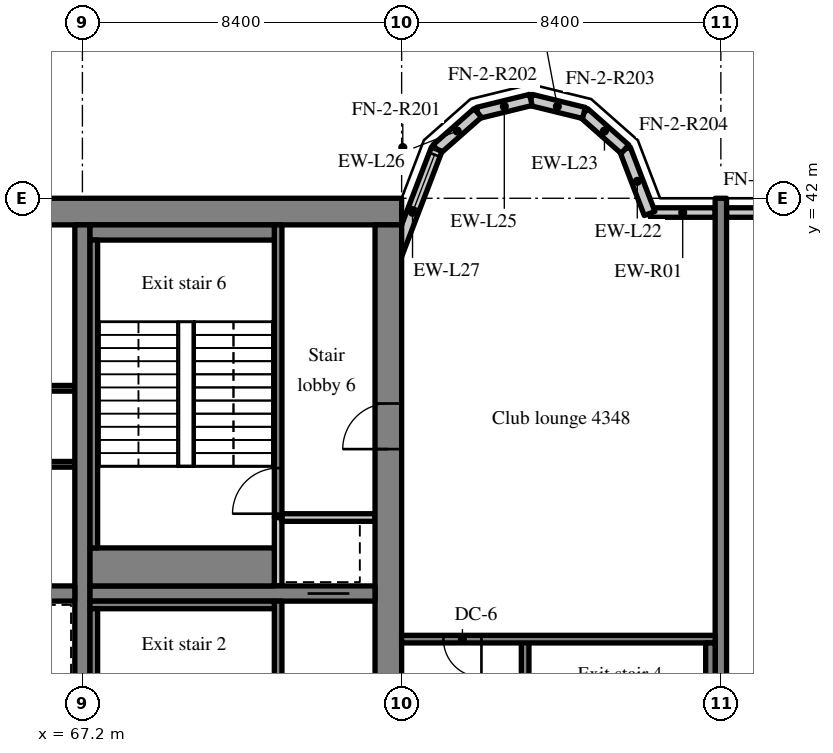
"""IFC4 building model, lengths in metres.
Left out: names, types, materials, properties, quantities, classifications, styles, units other than length and angle.
Written with IfcOpenShell. Run it as: python <this file> out.ifc"""

import sys

from ifc_helpers import new_model, si_unit, direction, frame, frame_2d, origin, place, context, subcontext, project, spatial, rectangle, extrude, source, transform, mapped, element, fill, save


model = new_model("IFC4")
c1 = context("Model", 3, precision=1e-05, world=origin(), true_north=direction((0.0, 1.0)))
c2 = subcontext(c1, "Body", "Model", "MODEL_VIEW")
j1 = project(units=[si_unit("LENGTHUNIT", "METRE"), si_unit("PLANEANGLEUNIT", "RADIAN")], contexts=[c1])
p1 = place(None, origin())
s1 = spatial("IfcSite", under=j1, at=p1, CompositionType="ELEMENT")
p2 = place(p1, origin())
s2 = spatial("IfcBuilding", under=s1, at=p2, CompositionType="ELEMENT")
p3 = place(p2, frame((0.0, 0.0, 178.2)))
s3 = spatial("IfcBuildingStorey", under=s2, at=p3, CompositionType="ELEMENT", Elevation=178.2)
m1 = source(origin(), c2, "Body", "SweptSolid", [
    extrude(rectangle(XDim=50.4, YDim=0.7, at=frame_2d((25.2, 0.0))), origin(), (0.0, 0.0, 1.0), 3.52),
])
p4 = place(p3, frame((25.2, 41.65, 0.0), z_axis=(0.0, 0.0, 1.0), x_axis=(1.0, 0.0, 0.0)))
e1 = element("IfcWall", 1, at=p4, inside=s3, PredefinedType="SHEAR", context=c2, shape_type="MappedRepresentation", body=[
    mapped(m1, transform((0.0, 0.0, 0.0), scale=1.0)),
])
m2 = source(origin(), c2, "Body", "SweptSolid", [
    extrude(rectangle(XDim=18.6, YDim=0.7, at=frame_2d((9.3, 0.0))), origin(), (0.0, 0.0, 1.0), 3.52),
])
p5 = place(p3, frame((75.25, 22.7, 0.0), z_axis=(0.0, 0.0, 1.0), x_axis=(0.0, 1.0, 0.0)))
e2 = element("IfcWall", 2, at=p5, inside=s3, PredefinedType="SHEAR", context=c2, shape_type="MappedRepresentation", body=[
    mapped(m2, transform((0.0, 0.0, 0.0), scale=1.0)),
])
m3 = source(origin(), c2, "Body", "SweptSolid", [
    extrude(rectangle(XDim=1.2, YDim=2.1, at=frame_2d((0.6, 1.05))), frame((0.0, 0.36, 0.0), z_axis=(0.0, -1.0, 0.0), x_axis=(1.0, 0.0, 0.0)), (0.0, 0.0, 1.0), 0.72),
])
p6 = place(p5, frame((12.7, 0.0, 0.0)))
e3 = element("IfcOpeningElement", 3, at=p6, cuts=e2, PredefinedType="OPENING", context=c2, shape_type="MappedRepresentation", body=[
    mapped(m3, transform((0.0, 0.0, 0.0), scale=1.0)),
])
m4 = source(origin(), c2, "Body", "SweptSolid", [
    extrude(rectangle(XDim=18.6, YDim=0.4, at=frame_2d((9.3, 0.0))), origin(), (0.0, 0.0, 1.0), 3.52),
])
p7 = place(p3, frame((67.2, 22.7, 0.0), z_axis=(0.0, 0.0, 1.0), x_axis=(0.0, 1.0, 0.0)))
e4 = element("IfcWall", 4, at=p7, inside=s3, PredefinedType="SHEAR", context=c2, shape_type="MappedRepresentation", body=[
    mapped(m4, transform((0.0, 0.0, 0.0), scale=1.0)),
])
m5 = source(origin(), c2, "Body", "SweptSolid", [
    extrude(rectangle(XDim=16.4, YDim=0.4, at=frame_2d((8.2, 0.0))), origin(), (0.0, 0.0, 1.0), 3.52),
])
p8 = place(p3, frame((50.6, 31.6, 0.0), z_axis=(0.0, 0.0, 1.0), x_axis=(1.0, 0.0, 0.0)))
e5 = element("IfcWall", 5, at=p8, inside=s3, PredefinedType="SHEAR", context=c2, shape_type="MappedRepresentation", body=[
    mapped(m5, transform((0.0, 0.0, 0.0), scale=1.0)),
])
m6 = source(origin(), c2, "Body", "SweptSolid", [
    extrude(rectangle(XDim=1.0, YDim=2.1, at=frame_2d((0.5, 1.05))), frame((0.0, 0.21, 0.0), z_axis=(0.0, -1.0, 0.0), x_axis=(1.0, 0.0, 0.0)), (0.0, 0.0, 1.0), 0.42),
])
p9 = place(p8, frame((0.6, 0.0, 0.0)))
e6 = element("IfcOpeningElement", 6, at=p9, cuts=e5, PredefinedType="OPENING", context=c2, shape_type="MappedRepresentation", body=[
    mapped(m6, transform((0.0, 0.0, 0.0), scale=1.0)),
])
m7 = source(origin(), c2, "Body", "SweptSolid", [
    extrude(rectangle(XDim=7.5, YDim=0.4, at=frame_2d((3.75, 0.0))), origin(), (0.0, 0.0, 1.0), 3.52),
])
p10 = place(p3, frame((67.4, 31.6, 0.0), z_axis=(0.0, 0.0, 1.0), x_axis=(1.0, 0.0, 0.0)))
e7 = element("IfcWall", 7, at=p10, inside=s3, PredefinedType="SHEAR", context=c2, shape_type="MappedRepresentation", body=[
    mapped(m7, transform((0.0, 0.0, 0.0), scale=1.0)),
])
m8 = source(origin(), c2, "Body", "SweptSolid", [
    extrude(rectangle(XDim=1.1, YDim=2.1, at=frame_2d((0.55, 1.05))), frame((0.0, 0.21, 0.0), z_axis=(0.0, -1.0, 0.0), x_axis=(1.0, 0.0, 0.0)), (0.0, 0.0, 1.0), 0.42),
])
p11 = place(p10, frame((5.725, 0.0, 0.0)))
e8 = element("IfcOpeningElement", 8, at=p11, cuts=e7, PredefinedType="OPENING", context=c2, shape_type="MappedRepresentation", body=[
    mapped(m8, transform((0.0, 0.0, 0.0), scale=1.0)),
])
m9 = source(origin(), c2, "Body", "SweptSolid", [
    extrude(rectangle(XDim=20.0, YDim=0.3, at=frame_2d((10.0, 0.0))), origin(), (0.0, 0.0, 1.0), 3.52),
])
p12 = place(p3, frame((84.0, 22.0, 0.0), z_axis=(0.0, 0.0, 1.0), x_axis=(0.0, 1.0, 0.0)))
e9 = element("IfcWall", 9, at=p12, inside=s3, PredefinedType="SHEAR", context=c2, shape_type="MappedRepresentation", body=[
    mapped(m9, transform((0.0, 0.0, 0.0), scale=1.0)),
])
m10 = source(origin(), c2, "Body", "SweptSolid", [
    extrude(rectangle(XDim=1.708, YDim=0.25, at=frame_2d((0.854, 0.0))), origin(), (0.0, 0.0, 1.0), 2.87),
])
p13 = place(p3, frame((83.85, 41.625, 0.0), z_axis=(0.0, 0.0, 1.0), x_axis=(-1.0, 0.0, 0.0)))
e10 = element("IfcWall", 10, at=p13, inside=s3, PredefinedType="SOLIDWALL", context=c2, shape_type="MappedRepresentation", body=[
    mapped(m10, transform((0.0, 0.0, 0.0), scale=1.0)),
])
m11 = source(origin(), c2, "Body", "SweptSolid", [
    extrude(rectangle(XDim=4.095, YDim=0.25, at=frame_2d((2.047, 0.0))), origin(), (0.0, 0.0, 1.0), 2.87),
])
p14 = place(p3, frame((88.245, 41.625, 0.0), z_axis=(0.0, 0.0, 1.0), x_axis=(-1.0, 0.0, 0.0)))
e11 = element("IfcWall", 11, at=p14, inside=s3, PredefinedType="SOLIDWALL", context=c2, shape_type="MappedRepresentation", body=[
    mapped(m11, transform((0.0, 0.0, 0.0), scale=1.0)),
])
m12 = source(origin(), c2, "Body", "SweptSolid", [
    extrude(rectangle(XDim=1.5, YDim=1.5, at=frame_2d((0.75, 0.75))), frame((0.0, 0.135, 0.0), z_axis=(0.0, -1.0, 0.0), x_axis=(1.0, 0.0, 0.0)), (0.0, 0.0, 1.0), 0.27),
])
p15 = place(p14, frame((1.297, 0.0, 0.9)))
e12 = element("IfcOpeningElement", 12, at=p15, cuts=e11, PredefinedType="OPENING", context=c2, shape_type="MappedRepresentation", body=[
    mapped(m12, transform((0.0, 0.0, 0.0), scale=1.0)),
])
m13 = source(origin(), c2, "Body", "SweptSolid", [
    extrude(rectangle(XDim=1.812, YDim=0.3, at=frame_2d((0.906, 0.0))), origin(), (0.0, 0.0, 1.0), 3.52),
])
p16 = place(p3, frame((82.125, 41.6, 0.0), z_axis=(0.0, 0.0, 1.0), x_axis=(-0.357877270961, 0.93376863244, 0.0)))
e13 = element("IfcWall", 13, at=p16, inside=s3, PredefinedType="SOLIDWALL", context=c2, shape_type="MappedRepresentation", body=[
    mapped(m13, transform((0.0, 0.0, 0.0), scale=1.0)),
])
m14 = source(origin(), c2, "Body", "SweptSolid", [
    extrude(rectangle(XDim=1.44, YDim=0.3, at=frame_2d((0.72, 0.0))), origin(), (0.0, 0.0, 1.0), 3.52),
])
p17 = place(p3, frame((81.477, 43.292, 0.0), z_axis=(0.0, 0.0, 1.0), x_axis=(-0.74957555648, 0.661918790432, 0.0)))
e14 = element("IfcWall", 14, at=p17, inside=s3, PredefinedType="SOLIDWALL", context=c2, shape_type="MappedRepresentation", body=[
    mapped(m14, transform((0.0, 0.0, 0.0), scale=1.0)),
])
m15 = source(origin(), c2, "Body", "SweptSolid", [
    extrude(rectangle(XDim=1.439, YDim=0.3, at=frame_2d((0.719, 0.0))), origin(), (0.0, 0.0, 1.0), 3.52),
])
for number, where, z_axis, x_axis in (
    (15, (80.397, 44.245, 0.0), (0.0, 0.0, 1.0), (-0.971, 0.238, 0.0)),
    (16, (79.0, 44.588, 0.0), (0.0, 0.0, 1.0), (-0.971, -0.238, 0.0)),
):
    element("IfcWall", number, at=place(p3, frame(where, z_axis=z_axis, x_axis=x_axis)), inside=s3, PredefinedType="SOLIDWALL", context=c2, shape_type="MappedRepresentation", body=[
        mapped(m15, transform((0.0, 0.0, 0.0), scale=1.0)),
    ])
p18 = place(p3, frame((77.603, 44.245, 0.0), z_axis=(0.0, 0.0, 1.0), x_axis=(-0.74957555648, -0.661918790432, 0.0)))
e17 = element("IfcWall", 17, at=p18, inside=s3, PredefinedType="SOLIDWALL", context=c2, shape_type="MappedRepresentation", body=[
    mapped(m14, transform((0.0, 0.0, 0.0), scale=1.0)),
])
m16 = source(origin(), c2, "Body", "SweptSolid", [
    extrude(rectangle(XDim=3.559, YDim=0.3, at=frame_2d((1.78, 0.0))), origin(), (0.0, 0.0, 1.0), 3.52),
])
p19 = place(p3, frame((76.523, 43.292, 0.0), z_axis=(0.0, 0.0, 1.0), x_axis=(-0.35779745313, -0.933799219604, 0.0)))
e18 = element("IfcWall", 18, at=p19, inside=s3, PredefinedType="SOLIDWALL", context=c2, shape_type="MappedRepresentation", body=[
    mapped(m16, transform((0.0, 0.0, 0.0), scale=1.0)),
])
m17 = source(origin(), c2, "Body", "SweptSolid", [
    extrude(rectangle(XDim=1.5, YDim=2.0, at=frame_2d((0.75, 1.0))), frame((0.0, 0.16, 0.0), z_axis=(0.0, -1.0, 0.0), x_axis=(1.0, 0.0, 0.0)), (0.0, 0.0, 1.0), 0.32),
])
p20 = place(p19, frame((0.156, 0.0, 0.9)))
e19 = element("IfcOpeningElement", 19, at=p20, cuts=e18, PredefinedType="OPENING", context=c2, shape_type="MappedRepresentation", body=[
    mapped(m17, transform((0.0, 0.0, 0.0), scale=1.0)),
])
m18 = source(origin(), c2, "Body", "SweptSolid", [
    extrude(rectangle(XDim=14.2, YDim=0.15, at=frame_2d((7.1, 0.0))), origin(), (0.0, 0.0, 1.0), 3.52),
])
p21 = place(p3, frame((67.0, 35.0, 0.0), z_axis=(0.0, 0.0, 1.0), x_axis=(-1.0, 0.0, 0.0)))
e20 = element("IfcWall", 20, at=p21, inside=s3, PredefinedType="PARTITIONING", context=c2, shape_type="MappedRepresentation", body=[
    mapped(m18, transform((0.0, 0.0, 0.0), scale=1.0)),
])
m19 = source(origin(), c2, "Body", "SweptSolid", [
    extrude(rectangle(XDim=0.9, YDim=2.1, at=frame_2d((0.45, 1.05))), frame((0.0, 0.085, 0.0), z_axis=(0.0, -1.0, 0.0), x_axis=(1.0, 0.0, 0.0)), (0.0, 0.0, 1.0), 0.17),
])
p22 = place(p21, frame((6.612, 0.0, 0.0)))
e21 = element("IfcOpeningElement", 21, at=p22, cuts=e20, PredefinedType="OPENING", context=c2, shape_type="MappedRepresentation", body=[
    mapped(m19, transform((0.0, 0.0, 0.0), scale=1.0)),
])
m20 = source(origin(), c2, "Body", "SweptSolid", [
    extrude(rectangle(XDim=16.4, YDim=0.15, at=frame_2d((8.2, 0.0))), origin(), (0.0, 0.0, 1.0), 3.52),
])
p23 = place(p3, frame((67.0, 37.0, 0.0), z_axis=(0.0, 0.0, 1.0), x_axis=(-1.0, 0.0, 0.0)))
e22 = element("IfcWall", 22, at=p23, inside=s3, PredefinedType="PARTITIONING", context=c2, shape_type="MappedRepresentation", body=[
    mapped(m20, transform((0.0, 0.0, 0.0), scale=1.0)),
])
p24 = place(p23, frame((3.24, 0.0, 0.0)))
e23 = element("IfcOpeningElement", 23, at=p24, cuts=e22, PredefinedType="OPENING", context=c2, shape_type="MappedRepresentation", body=[
    mapped(m19, transform((0.0, 0.0, 0.0), scale=1.0)),
])
p25 = place(p23, frame((8.16, 0.0, 0.0)))
e24 = element("IfcOpeningElement", 24, at=p25, cuts=e22, PredefinedType="OPENING", context=c2, shape_type="MappedRepresentation", body=[
    mapped(m19, transform((0.0, 0.0, 0.0), scale=1.0)),
])
p26 = place(p23, frame((11.44, 0.0, 0.0)))
e25 = element("IfcOpeningElement", 25, at=p26, cuts=e22, PredefinedType="OPENING", context=c2, shape_type="MappedRepresentation", body=[
    mapped(m19, transform((0.0, 0.0, 0.0), scale=1.0)),
])
p27 = place(p23, frame((14.72, 0.0, 0.0)))
e26 = element("IfcOpeningElement", 26, at=p27, cuts=e22, PredefinedType="OPENING", context=c2, shape_type="MappedRepresentation", body=[
    mapped(m19, transform((0.0, 0.0, 0.0), scale=1.0)),
])
m21 = source(origin(), c2, "Body", "SweptSolid", [
    extrude(rectangle(XDim=8.7, YDim=0.2, at=frame_2d((4.35, 0.0))), origin(), (0.0, 0.0, 1.0), 3.52),
])
p28 = place(p3, frame((72.35, 22.7, 0.0), z_axis=(0.0, 0.0, 1.0), x_axis=(0.0, 1.0, 0.0)))
e27 = element("IfcWall", 27, at=p28, inside=s3, PredefinedType="SOLIDWALL", context=c2, shape_type="MappedRepresentation", body=[
    mapped(m21, transform((0.0, 0.0, 0.0), scale=1.0)),
])
m22 = source(origin(), c2, "Body", "SweptSolid", [
    extrude(rectangle(XDim=1.2, YDim=2.1, at=frame_2d((0.6, 1.05))), frame((0.0, 0.11, 0.0), z_axis=(0.0, -1.0, 0.0), x_axis=(1.0, 0.0, 0.0)), (0.0, 0.0, 1.0), 0.22),
])
p29 = place(p28, frame((0.9, 0.0, 0.0)))
e28 = element("IfcOpeningElement", 28, at=p29, cuts=e27, PredefinedType="OPENING", context=c2, shape_type="MappedRepresentation", body=[
    mapped(m22, transform((0.0, 0.0, 0.0), scale=1.0)),
])
m23 = source(origin(), c2, "Body", "SweptSolid", [
    extrude(rectangle(XDim=1.8, YDim=0.2, at=frame_2d((0.9, 0.0))), origin(), (0.0, 0.0, 1.0), 3.52),
])
p30 = place(p3, frame((72.35, 31.8, 0.0), z_axis=(0.0, 0.0, 1.0), x_axis=(0.0, 1.0, 0.0)))
e29 = element("IfcWall", 29, at=p30, inside=s3, PredefinedType="SOLIDWALL", context=c2, shape_type="MappedRepresentation", body=[
    mapped(m23, transform((0.0, 0.0, 0.0), scale=1.0)),
])
m24 = source(origin(), c2, "Body", "SweptSolid", [
    extrude(rectangle(XDim=2.45, YDim=0.2, at=frame_2d((1.225, 0.0))), origin(), (0.0, 0.0, 1.0), 3.52),
])
p31 = place(p3, frame((72.45, 33.6, 0.0), z_axis=(0.0, 0.0, 1.0), x_axis=(1.0, 0.0, 0.0)))
e30 = element("IfcWall", 30, at=p31, inside=s3, PredefinedType="SOLIDWALL", context=c2, shape_type="MappedRepresentation", body=[
    mapped(m24, transform((0.0, 0.0, 0.0), scale=1.0)),
])
m25 = source(origin(), c2, "Body", "SweptSolid", [
    extrude(rectangle(XDim=7.7, YDim=0.2, at=frame_2d((3.85, 0.0))), origin(), (0.0, 0.0, 1.0), 3.52),
])
p32 = place(p3, frame((72.35, 33.6, 0.0), z_axis=(0.0, 0.0, 1.0), x_axis=(0.0, 1.0, 0.0)))
e31 = element("IfcWall", 31, at=p32, inside=s3, PredefinedType="SOLIDWALL", context=c2, shape_type="MappedRepresentation", body=[
    mapped(m25, transform((0.0, 0.0, 0.0), scale=1.0)),
])
p33 = place(p32, frame((0.1, 0.0, 0.0)))
e32 = element("IfcOpeningElement", 32, at=p33, cuts=e31, PredefinedType="OPENING", context=c2, shape_type="MappedRepresentation", body=[
    mapped(m22, transform((0.0, 0.0, 0.0), scale=1.0)),
])
m26 = source(origin(), c2, "Body", "SweptSolid", [
    extrude(rectangle(XDim=8.3, YDim=0.2, at=frame_2d((4.15, 0.0))), origin(), (0.0, 0.0, 1.0), 3.52),
])
p34 = place(p3, frame((78.85, 22.1, 0.0), z_axis=(0.0, 0.0, 1.0), x_axis=(0.0, 1.0, 0.0)))
e33 = element("IfcWall", 33, at=p34, inside=s3, PredefinedType="SOLIDWALL", context=c2, shape_type="MappedRepresentation", body=[
    mapped(m26, transform((0.0, 0.0, 0.0), scale=1.0)),
])
p35 = place(p34, frame((0.6, 0.0, 0.0)))
e34 = element("IfcOpeningElement", 34, at=p35, cuts=e33, PredefinedType="OPENING", context=c2, shape_type="MappedRepresentation", body=[
    mapped(m22, transform((0.0, 0.0, 0.0), scale=1.0)),
])
m27 = source(origin(), c2, "Body", "SweptSolid", [
    extrude(rectangle(XDim=8.25, YDim=0.2, at=frame_2d((4.125, 0.0))), origin(), (0.0, 0.0, 1.0), 3.52),
])
p36 = place(p3, frame((83.85, 30.4, 0.0), z_axis=(0.0, 0.0, 1.0), x_axis=(-1.0, 0.0, 0.0)))
e35 = element("IfcWall", 35, at=p36, inside=s3, PredefinedType="SOLIDWALL", context=c2, shape_type="MappedRepresentation", body=[
    mapped(m27, transform((0.0, 0.0, 0.0), scale=1.0)),
])
m28 = source(origin(), c2, "Body", "SweptSolid", [
    extrude(rectangle(XDim=1.0, YDim=2.1, at=frame_2d((0.5, 1.05))), frame((0.0, 0.11, 0.0), z_axis=(0.0, -1.0, 0.0), x_axis=(1.0, 0.0, 0.0)), (0.0, 0.0, 1.0), 0.22),
])
p37 = place(p36, frame((6.15, 0.0, 0.0)))
e36 = element("IfcOpeningElement", 36, at=p37, cuts=e35, PredefinedType="OPENING", context=c2, shape_type="MappedRepresentation", body=[
    mapped(m28, transform((0.0, 0.0, 0.0), scale=1.0)),
])
m29 = source(origin(), c2, "Body", "SweptSolid", [
    extrude(rectangle(XDim=4.85, YDim=0.2, at=frame_2d((2.425, 0.0))), origin(), (0.0, 0.0, 1.0), 3.52),
])
p38 = place(p3, frame((67.4, 31.3, 0.0), z_axis=(0.0, 0.0, 1.0), x_axis=(1.0, 0.0, 0.0)))
e37 = element("IfcWall", 37, at=p38, inside=s3, PredefinedType="SOLIDWALL", context=c2, shape_type="MappedRepresentation", body=[
    mapped(m29, transform((0.0, 0.0, 0.0), scale=1.0)),
])
m30 = source(origin(), c2, "Body", "SweptSolid", [
    extrude(rectangle(XDim=8.1, YDim=0.2, at=frame_2d((4.05, 0.0))), origin(), (0.0, 0.0, 1.0), 3.52),
])
p39 = place(p3, frame((67.5, 23.1, 0.0), z_axis=(0.0, 0.0, 1.0), x_axis=(0.0, 1.0, 0.0)))
e38 = element("IfcWall", 38, at=p39, inside=s3, PredefinedType="SOLIDWALL", context=c2, shape_type="MappedRepresentation", body=[
    mapped(m30, transform((0.0, 0.0, 0.0), scale=1.0)),
])
m31 = source(origin(), c2, "Body", "SweptSolid", [
    extrude(rectangle(XDim=4.85, YDim=0.4, at=frame_2d((2.425, 0.0))), origin(), (0.0, 0.0, 1.0), 3.52),
])
p40 = place(p3, frame((67.4, 41.1, 0.0), z_axis=(0.0, 0.0, 1.0), x_axis=(1.0, 0.0, 0.0)))
e39 = element("IfcWall", 39, at=p40, inside=s3, PredefinedType="SOLIDWALL", context=c2, shape_type="MappedRepresentation", body=[
    mapped(m31, transform((0.0, 0.0, 0.0), scale=1.0)),
])
m32 = source(origin(), c2, "Body", "SweptSolid", [
    extrude(rectangle(XDim=4.85, YDim=1.0, at=frame_2d((2.425, 0.0))), origin(), (0.0, 0.0, 1.0), 3.52),
])
p41 = place(p3, frame((67.4, 32.3, 0.0), z_axis=(0.0, 0.0, 1.0), x_axis=(1.0, 0.0, 0.0)))
e40 = element("IfcWall", 40, at=p41, inside=s3, PredefinedType="SOLIDWALL", context=c2, shape_type="MappedRepresentation", body=[
    mapped(m32, transform((0.0, 0.0, 0.0), scale=1.0)),
])
p42 = place(p3, frame((67.5, 32.8, 0.0), z_axis=(0.0, 0.0, 1.0), x_axis=(0.0, 1.0, 0.0)))
e41 = element("IfcWall", 41, at=p42, inside=s3, PredefinedType="SOLIDWALL", context=c2, shape_type="MappedRepresentation", body=[
    mapped(m30, transform((0.0, 0.0, 0.0), scale=1.0)),
])
m33 = source(origin(), c2, "Body", "SweptSolid", [
    extrude(rectangle(XDim=8.1, YDim=0.25, at=frame_2d((4.05, 0.0))), origin(), (0.0, 0.0, 1.0), 3.52),
])
p43 = place(p3, frame((83.725, 22.2, 0.0), z_axis=(0.0, 0.0, 1.0), x_axis=(0.0, 1.0, 0.0)))
e42 = element("IfcWall", 42, at=p43, inside=s3, PredefinedType="SOLIDWALL", context=c2, shape_type="MappedRepresentation", body=[
    mapped(m33, transform((0.0, 0.0, 0.0), scale=1.0)),
])
m34 = source(origin(), c2, "Body", "SweptSolid", [
    extrude(rectangle(XDim=1.5, YDim=2.0, at=frame_2d((0.75, 1.0))), frame((0.0, 0.03, 0.0), z_axis=(0.0, -1.0, 0.0), x_axis=(1.0, 0.0, 0.0)), (0.0, 0.0, 1.0), 0.06),
])
p44 = place(p20, origin())
e43 = element("IfcWindow", 43, at=p44, inside=s3, PartitioningType="SINGLE_PANEL", PredefinedType="WINDOW", context=c2, shape_type="MappedRepresentation", body=[
    mapped(m34, transform((0.0, 0.0, 0.0), scale=1.0)),
])
fill(e19, e43)
m35 = source(origin(), c2, "Body", "SweptSolid", [
    extrude(rectangle(XDim=1.1, YDim=2.1, at=frame_2d((0.55, 1.05))), frame((0.0, 0.025, 0.0), z_axis=(0.0, -1.0, 0.0), x_axis=(1.0, 0.0, 0.0)), (0.0, 0.0, 1.0), 0.05),
])
p45 = place(p11, origin())
e44 = element("IfcDoor", 44, at=p45, inside=s3, OperationType="SLIDING_TO_LEFT", PredefinedType="DOOR", context=c2, shape_type="MappedRepresentation", body=[
    mapped(m35, transform((0.0, 0.0, 0.0), scale=1.0)),
])
fill(e8, e44)
m36 = source(origin(), c2, "Body", "SweptSolid", [
    extrude(rectangle(XDim=1.2, YDim=2.1, at=frame_2d((0.6, 1.05))), frame((0.0, 0.025, 0.0), z_axis=(0.0, -1.0, 0.0), x_axis=(1.0, 0.0, 0.0)), (0.0, 0.0, 1.0), 0.05),
])
p46 = place(p33, origin())
e45 = element("IfcDoor", 45, at=p46, inside=s3, OperationType="SINGLE_SWING_LEFT", PredefinedType="DOOR", context=c2, shape_type="MappedRepresentation", body=[
    mapped(m36, transform((0.0, 0.0, 0.0), scale=1.0)),
])
fill(e32, e45)
p47 = place(p6, origin())
e46 = element("IfcDoor", 46, at=p47, inside=s3, OperationType="SINGLE_SWING_LEFT", PredefinedType="DOOR", context=c2, shape_type="MappedRepresentation", body=[
    mapped(m36, transform((0.0, 0.0, 0.0), scale=1.0)),
])
fill(e3, e46)
m37 = source(origin(), c2, "Body", "SweptSolid", [
    extrude(rectangle(XDim=1.0, YDim=2.1, at=frame_2d((0.5, 1.05))), frame((0.0, 0.025, 0.0), z_axis=(0.0, -1.0, 0.0), x_axis=(1.0, 0.0, 0.0)), (0.0, 0.0, 1.0), 0.05),
])
p48 = place(p37, origin())
e47 = element("IfcDoor", 47, at=p48, inside=s3, OperationType="SINGLE_SWING_LEFT", PredefinedType="DOOR", context=c2, shape_type="MappedRepresentation", body=[
    mapped(m37, transform((0.0, 0.0, 0.0), scale=1.0)),
])
fill(e36, e47)
save(model, sys.argv[1])
